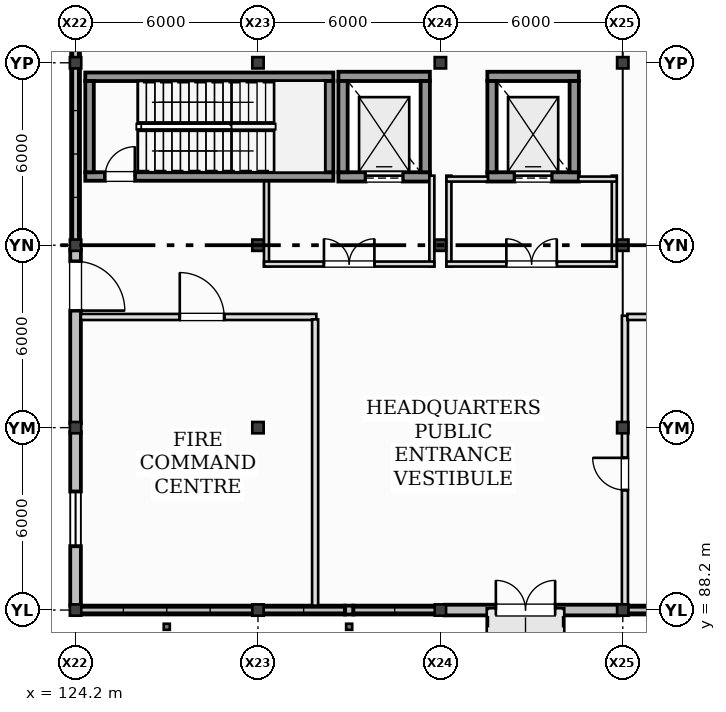
"""IFC4 building model, lengths in metres.
Left out: names, types, materials, properties, quantities, classifications, styles, units other than length and angle.
Written with IfcOpenShell. Run it as: python <this file> out.ifc"""

import sys

from ifc_helpers import new_model, si_unit, direction, frame, frame_2d, origin, origin_2d, place, context, subcontext, project, spatial, rectangle, hollow_rectangle, i_section, extrude, element, fill, save


model = new_model("IFC4")
c1 = context("Model", 3, precision=1e-05, world=origin(), true_north=direction((0.0, 1.0)))
c2 = subcontext(c1, "Body", "Model", "MODEL_VIEW")
j1 = project(units=[si_unit("LENGTHUNIT", "METRE"), si_unit("PLANEANGLEUNIT", "RADIAN")], contexts=[c1])
p1 = place(None, origin())
s1 = spatial("IfcSite", under=j1, at=p1, CompositionType="ELEMENT")
p2 = place(p1, origin())
s2 = spatial("IfcBuilding", under=s1, at=p2, CompositionType="ELEMENT")
p3 = place(p2, origin())
s3 = spatial("IfcBuildingStorey", under=s2, at=p3, CompositionType="ELEMENT", Elevation=0.0)
for number, where, z_axis, x_axis in (
    (1, (124.2, 88.2, 0.0), (0.0, 0.0, 1.0), (1.0, 0.0, 0.0)),
    (2, (124.2, 94.2, 0.0), (0.0, 0.0, 1.0), (1.0, 0.0, 0.0)),
    (3, (124.2, 100.2, 0.0), (0.0, 0.0, 1.0), (1.0, 0.0, 0.0)),
    (4, (124.2, 106.2, 0.0), (0.0, 0.0, 1.0), (1.0, 0.0, 0.0)),
    (5, (130.2, 88.2, 0.0), (0.0, 0.0, 1.0), (1.0, 0.0, 0.0)),
    (6, (130.2, 94.2, 0.0), (0.0, 0.0, 1.0), (1.0, 0.0, 0.0)),
    (7, (130.2, 100.2, 0.0), (0.0, 0.0, 1.0), (1.0, 0.0, 0.0)),
    (8, (130.2, 106.2, 0.0), (0.0, 0.0, 1.0), (1.0, 0.0, 0.0)),
    (9, (136.2, 88.2, 0.0), (0.0, 0.0, 1.0), (1.0, 0.0, 0.0)),
    (10, (136.2, 94.2, 0.0), (0.0, 0.0, 1.0), (1.0, 0.0, 0.0)),
    (11, (136.2, 100.2, 0.0), (0.0, 0.0, 1.0), (1.0, 0.0, 0.0)),
    (12, (136.2, 106.2, 0.0), (0.0, 0.0, 1.0), (1.0, 0.0, 0.0)),
    (13, (142.2, 88.2, 0.0), (0.0, 0.0, 1.0), (1.0, 0.0, 0.0)),
    (14, (142.2, 94.2, 0.0), (0.0, 0.0, 1.0), (1.0, 0.0, 0.0)),
    (15, (142.2, 100.2, 0.0), (0.0, 0.0, 1.0), (1.0, 0.0, 0.0)),
    (16, (142.2, 106.2, 0.0), (0.0, 0.0, 1.0), (1.0, 0.0, 0.0)),
):
    element("IfcColumn", number, at=place(p3, frame(where, z_axis=z_axis, x_axis=x_axis)), inside=s3, PredefinedType="COLUMN", context=c2, shape_type="SweptSolid", body=[
        extrude(i_section(OverallWidth=0.374, OverallDepth=0.372, WebThickness=0.016, FlangeThickness=0.026, at=origin_2d()), origin(), (0.0, 0.0, 1.0), 6.0),
    ])
for number, where, z_axis, x_axis in (
    (17, (127.2, 87.65, -0.35), (0.0, 0.0, 1.0), (1.0, 0.0, 0.0)),
    (18, (133.2, 87.65, -0.35), (0.0, 0.0, 1.0), (1.0, 0.0, 0.0)),
):
    element("IfcColumn", number, at=place(p3, frame(where, z_axis=z_axis, x_axis=x_axis)), inside=s3, PredefinedType="PILASTER", context=c2, shape_type="SweptSolid", body=[
        extrude(hollow_rectangle(XDim=0.2, YDim=0.2, WallThickness=0.01, at=origin_2d()), origin(), (0.0, 0.0, 1.0), 6.35),
    ])
p4 = place(p3, frame((124.345, 88.2, 0.0), z_axis=(0.0, 0.0, 1.0), x_axis=(1.0, 0.0, 0.0)))
e19 = element("IfcWall", 19, at=p4, inside=s3, PredefinedType="STANDARD", context=c2, shape_type="SweptSolid", body=[
    extrude(rectangle(XDim=5.71, YDim=0.29, at=frame_2d((2.855, 0.0))), origin(), (0.0, 0.0, 1.0), 0.68),
])
p5 = place(p3, frame((133.06, 88.2, 0.0), z_axis=(0.0, 0.0, 1.0), x_axis=(1.0, 0.0, 0.0)))
e20 = element("IfcWall", 20, at=p5, inside=s3, PredefinedType="STANDARD", context=c2, shape_type="SweptSolid", body=[
    extrude(rectangle(XDim=0.28, YDim=0.29, at=frame_2d((0.14, 0.0))), origin(), (0.0, 0.0, 1.0), 5.113),
])
p6 = place(p3, frame((130.345, 88.2, 0.0), z_axis=(0.0, 0.0, 1.0), x_axis=(1.0, 0.0, 0.0)))
e21 = element("IfcWall", 21, at=p6, inside=s3, PredefinedType="STANDARD", context=c2, shape_type="SweptSolid", body=[
    extrude(rectangle(XDim=2.715, YDim=0.29, at=frame_2d((1.357, 0.0))), origin(), (0.0, 0.0, 1.0), 0.8),
])
p7 = place(p3, frame((133.34, 88.2, 0.0), z_axis=(0.0, 0.0, 1.0), x_axis=(1.0, 0.0, 0.0)))
e22 = element("IfcWall", 22, at=p7, inside=s3, PredefinedType="STANDARD", context=c2, shape_type="SweptSolid", body=[
    extrude(rectangle(XDim=2.715, YDim=0.29, at=frame_2d((1.357, 0.0))), origin(), (0.0, 0.0, 1.0), 0.92),
])
p8 = place(p3, frame((136.345, 88.2, 0.0), z_axis=(0.0, 0.0, 1.0), x_axis=(1.0, 0.0, 0.0)))
e23 = element("IfcWall", 23, at=p8, inside=s3, PredefinedType="STANDARD", context=c2, shape_type="SweptSolid", body=[
    extrude(rectangle(XDim=5.71, YDim=0.35, at=frame_2d((2.855, 0.0))), origin(), (0.0, 0.0, 1.0), 5.113),
])
p9 = place(p8, frame((1.68, 0.0, 0.0)))
e24 = element("IfcOpeningElement", 24, at=p9, cuts=e23, PredefinedType="OPENING", context=c2, shape_type="SweptSolid", body=[
    extrude(rectangle(XDim=1.95, YDim=2.35, at=frame_2d((0.975, 1.175))), frame((0.0, 0.185, 0.0), z_axis=(0.0, -1.0, 0.0), x_axis=(1.0, 0.0, 0.0)), (0.0, 0.0, 1.0), 0.37),
])
p10 = place(p3, frame((142.345, 88.2, 0.0), z_axis=(0.0, 0.0, 1.0), x_axis=(1.0, 0.0, 0.0)))
e25 = element("IfcWall", 25, at=p10, inside=s3, PredefinedType="STANDARD", context=c2, shape_type="SweptSolid", body=[
    extrude(rectangle(XDim=2.715, YDim=0.29, at=frame_2d((1.357, 0.0))), origin(), (0.0, 0.0, 1.0), 0.32),
])
p11 = place(p3, frame((124.2, 94.055, 0.0), z_axis=(0.0, 0.0, 1.0), x_axis=(0.0, -1.0, 0.0)))
e26 = element("IfcWall", 26, at=p11, inside=s3, PredefinedType="STANDARD", context=c2, shape_type="SweptSolid", body=[
    extrude(rectangle(XDim=5.71, YDim=0.35, at=frame_2d((2.855, 0.0))), origin(), (0.0, 0.0, 1.0), 5.044),
])
p12 = place(p11, frame((1.955, 0.0, 1.0)))
e27 = element("IfcOpeningElement", 27, at=p12, cuts=e26, PredefinedType="OPENING", context=c2, shape_type="SweptSolid", body=[
    extrude(rectangle(XDim=1.8, YDim=1.36, at=frame_2d((0.9, 0.68))), frame((0.0, 0.185, 0.0), z_axis=(0.0, -1.0, 0.0), x_axis=(1.0, 0.0, 0.0)), (0.0, 0.0, 1.0), 0.37),
])
p13 = place(p3, frame((124.2, 100.055, 0.0), z_axis=(0.0, 0.0, 1.0), x_axis=(0.0, -1.0, 0.0)))
e28 = element("IfcWall", 28, at=p13, inside=s3, PredefinedType="STANDARD", context=c2, shape_type="SweptSolid", body=[
    extrude(rectangle(XDim=5.71, YDim=0.35, at=frame_2d((2.855, 0.0))), origin(), (0.0, 0.0, 1.0), 5.044),
])
p14 = place(p13, frame((0.386, 0.0, 0.0)))
e29 = element("IfcOpeningElement", 29, at=p14, cuts=e28, PredefinedType="OPENING", context=c2, shape_type="SweptSolid", body=[
    extrude(rectangle(XDim=1.62, YDim=2.2, at=frame_2d((0.81, 1.1))), frame((0.0, 0.185, 0.0), z_axis=(0.0, -1.0, 0.0), x_axis=(1.0, 0.0, 0.0)), (0.0, 0.0, 1.0), 0.37),
])
p15 = place(p3, frame((124.2, 106.055, 0.0), z_axis=(0.0, 0.0, 1.0), x_axis=(0.0, -1.0, 0.0)))
e30 = element("IfcWall", 30, at=p15, inside=s3, PredefinedType="STANDARD", context=c2, shape_type="SweptSolid", body=[
    extrude(rectangle(XDim=5.71, YDim=0.29, at=frame_2d((2.855, 0.0))), origin(), (0.0, 0.0, 1.0), 0.56),
])
p16 = place(p3, frame((124.2, 109.06, 0.0), z_axis=(0.0, 0.0, 1.0), x_axis=(0.0, -1.0, 0.0)))
e31 = element("IfcWall", 31, at=p16, inside=s3, PredefinedType="STANDARD", context=c2, shape_type="SweptSolid", body=[
    extrude(rectangle(XDim=2.715, YDim=0.29, at=frame_2d((1.357, 0.0))), origin(), (0.0, 0.0, 1.0), 0.8),
])
p17 = place(p3, frame((124.52, 102.46, 0.0), z_axis=(0.0, 0.0, 1.0), x_axis=(1.0, 0.0, 0.0)))
e32 = element("IfcWall", 32, at=p17, inside=s3, PredefinedType="SHEAR", context=c2, shape_type="SweptSolid", body=[
    extrude(rectangle(XDim=8.16, YDim=0.28, at=frame_2d((4.08, 0.0))), origin(), (0.0, 0.0, 1.0), 6.0),
])
p18 = place(p17, frame((0.65, 0.0, 0.0)))
e33 = element("IfcOpeningElement", 33, at=p18, cuts=e32, PredefinedType="OPENING", context=c2, shape_type="SweptSolid", body=[
    extrude(rectangle(XDim=0.98, YDim=2.15, at=frame_2d((0.49, 1.075))), frame((0.0, 0.15, 0.0), z_axis=(0.0, -1.0, 0.0), x_axis=(1.0, 0.0, 0.0)), (0.0, 0.0, 1.0), 0.3),
])
p19 = place(p3, frame((132.68, 105.74, 0.0), z_axis=(0.0, 0.0, 1.0), x_axis=(-1.0, 0.0, 0.0)))
e34 = element("IfcWall", 34, at=p19, inside=s3, PredefinedType="SHEAR", context=c2, shape_type="SweptSolid", body=[
    extrude(rectangle(XDim=8.16, YDim=0.28, at=frame_2d((4.08, 0.0))), origin(), (0.0, 0.0, 1.0), 6.0),
])
for number, where, z_axis, x_axis in (
    (35, (124.66, 105.6, 0.0), (0.0, 0.0, 1.0), (0.0, -1.0, 0.0)),
    (36, (132.54, 102.6, 0.0), (0.0, 0.0, 1.0), (0.0, 1.0, 0.0)),
):
    element("IfcWall", number, at=place(p3, frame(where, z_axis=z_axis, x_axis=x_axis)), inside=s3, PredefinedType="SHEAR", context=c2, shape_type="SweptSolid", body=[
        extrude(rectangle(XDim=3.0, YDim=0.28, at=frame_2d((1.5, 0.0))), origin(), (0.0, 0.0, 1.0), 6.0),
    ])
p20 = place(p3, frame((132.845, 102.448, 0.0), z_axis=(0.0, 0.0, 1.0), x_axis=(1.0, 0.0, 0.0)))
e37 = element("IfcWall", 37, at=p20, inside=s3, PredefinedType="SHEAR", context=c2, shape_type="SweptSolid", body=[
    extrude(rectangle(XDim=3.01, YDim=0.305, at=frame_2d((1.505, 0.0))), origin(), (0.0, 0.0, 1.0), 6.0),
])
p21 = place(p20, frame((0.895, 0.0, 0.0)))
e38 = element("IfcOpeningElement", 38, at=p21, cuts=e37, PredefinedType="OPENING", context=c2, shape_type="SweptSolid", body=[
    extrude(rectangle(XDim=1.22, YDim=2.22, at=frame_2d((0.61, 1.11))), frame((0.0, 0.162, 0.0), z_axis=(0.0, -1.0, 0.0), x_axis=(1.0, 0.0, 0.0)), (0.0, 0.0, 1.0), 0.325),
])
p22 = place(p3, frame((135.855, 105.752, 0.0), z_axis=(0.0, 0.0, 1.0), x_axis=(-1.0, 0.0, 0.0)))
e39 = element("IfcWall", 39, at=p22, inside=s3, PredefinedType="SHEAR", context=c2, shape_type="SweptSolid", body=[
    extrude(rectangle(XDim=3.01, YDim=0.305, at=frame_2d((1.505, 0.0))), origin(), (0.0, 0.0, 1.0), 6.0),
])
for number, where, z_axis, x_axis in (
    (40, (132.998, 105.6, 0.0), (0.0, 0.0, 1.0), (0.0, -1.0, 0.0)),
    (41, (135.702, 102.6, 0.0), (0.0, 0.0, 1.0), (0.0, 1.0, 0.0)),
):
    element("IfcWall", number, at=place(p3, frame(where, z_axis=z_axis, x_axis=x_axis)), inside=s3, PredefinedType="SHEAR", context=c2, shape_type="SweptSolid", body=[
        extrude(rectangle(XDim=3.0, YDim=0.305, at=frame_2d((1.5, 0.0))), origin(), (0.0, 0.0, 1.0), 6.0),
    ])
for number, where, z_axis, x_axis in (
    (42, (130.48, 99.5, 0.0), (0.0, 0.0, 1.0), (0.0, 1.0, 0.0)),
    (43, (135.92, 102.488, 0.0), (0.0, 0.0, 1.0), (0.0, -1.0, 0.0)),
):
    element("IfcWall", number, at=place(p3, frame(where, z_axis=z_axis, x_axis=x_axis)), inside=s3, PredefinedType="PARTITIONING", context=c2, shape_type="SweptSolid", body=[
        extrude(rectangle(XDim=2.988, YDim=0.165, at=frame_2d((1.494, 0.0))), origin(), (0.0, 0.0, 1.0), 5.044),
    ])
p23 = place(p3, frame((130.4, 99.58, 0.0), z_axis=(0.0, 0.0, 1.0), x_axis=(1.0, 0.0, 0.0)))
e44 = element("IfcWall", 44, at=p23, inside=s3, PredefinedType="PARTITIONING", context=c2, shape_type="SweptSolid", body=[
    extrude(rectangle(XDim=5.6, YDim=0.165, at=frame_2d((2.8, 0.0))), origin(), (0.0, 0.0, 1.0), 5.68),
])
p24 = place(p23, frame((1.97, 0.0, 0.0)))
e45 = element("IfcOpeningElement", 45, at=p24, cuts=e44, PredefinedType="OPENING", context=c2, shape_type="SweptSolid", body=[
    extrude(rectangle(XDim=1.66, YDim=2.2, at=frame_2d((0.83, 1.1))), frame((0.0, 0.093, 0.0), z_axis=(0.0, -1.0, 0.0), x_axis=(1.0, 0.0, 0.0)), (0.0, 0.0, 1.0), 0.185),
])
p25 = place(p3, frame((137.745, 102.448, 0.0), z_axis=(0.0, 0.0, 1.0), x_axis=(1.0, 0.0, 0.0)))
e46 = element("IfcWall", 46, at=p25, inside=s3, PredefinedType="SHEAR", context=c2, shape_type="SweptSolid", body=[
    extrude(rectangle(XDim=3.01, YDim=0.305, at=frame_2d((1.505, 0.0))), origin(), (0.0, 0.0, 1.0), 6.0),
])
p26 = place(p25, frame((0.895, 0.0, 0.0)))
e47 = element("IfcOpeningElement", 47, at=p26, cuts=e46, PredefinedType="OPENING", context=c2, shape_type="SweptSolid", body=[
    extrude(rectangle(XDim=1.22, YDim=2.22, at=frame_2d((0.61, 1.11))), frame((0.0, 0.162, 0.0), z_axis=(0.0, -1.0, 0.0), x_axis=(1.0, 0.0, 0.0)), (0.0, 0.0, 1.0), 0.325),
])
p27 = place(p3, frame((140.755, 105.752, 0.0), z_axis=(0.0, 0.0, 1.0), x_axis=(-1.0, 0.0, 0.0)))
e48 = element("IfcWall", 48, at=p27, inside=s3, PredefinedType="SHEAR", context=c2, shape_type="SweptSolid", body=[
    extrude(rectangle(XDim=3.01, YDim=0.305, at=frame_2d((1.505, 0.0))), origin(), (0.0, 0.0, 1.0), 6.0),
])
for number, where, z_axis, x_axis in (
    (49, (137.897, 105.6, 0.0), (0.0, 0.0, 1.0), (0.0, -1.0, 0.0)),
    (50, (140.603, 102.6, 0.0), (0.0, 0.0, 1.0), (0.0, 1.0, 0.0)),
):
    element("IfcWall", number, at=place(p3, frame(where, z_axis=z_axis, x_axis=x_axis)), inside=s3, PredefinedType="SHEAR", context=c2, shape_type="SweptSolid", body=[
        extrude(rectangle(XDim=3.0, YDim=0.305, at=frame_2d((1.5, 0.0))), origin(), (0.0, 0.0, 1.0), 6.0),
    ])
for number, where, z_axis, x_axis in (
    (51, (136.48, 99.5, 0.0), (0.0, 0.0, 1.0), (0.0, 1.0, 0.0)),
    (52, (141.92, 102.488, 0.0), (0.0, 0.0, 1.0), (0.0, -1.0, 0.0)),
):
    element("IfcWall", number, at=place(p3, frame(where, z_axis=z_axis, x_axis=x_axis)), inside=s3, PredefinedType="PARTITIONING", context=c2, shape_type="SweptSolid", body=[
        extrude(rectangle(XDim=2.988, YDim=0.165, at=frame_2d((1.494, 0.0))), origin(), (0.0, 0.0, 1.0), 5.044),
    ])
p28 = place(p3, frame((136.4, 102.375, 0.0), z_axis=(0.0, 0.0, 1.0), x_axis=(1.0, 0.0, 0.0)))
e53 = element("IfcWall", 53, at=p28, inside=s3, PredefinedType="PARTITIONING", context=c2, shape_type="SweptSolid", body=[
    extrude(rectangle(XDim=1.365, YDim=0.165, at=frame_2d((0.683, 0.0))), origin(), (0.0, 0.0, 1.0), 5.68),
])
p29 = place(p3, frame((140.735, 102.375, 0.0), z_axis=(0.0, 0.0, 1.0), x_axis=(1.0, 0.0, 0.0)))
e54 = element("IfcWall", 54, at=p29, inside=s3, PredefinedType="PARTITIONING", context=c2, shape_type="SweptSolid", body=[
    extrude(rectangle(XDim=1.265, YDim=0.165, at=frame_2d((0.632, 0.0))), origin(), (0.0, 0.0, 1.0), 5.68),
])
p30 = place(p3, frame((136.4, 99.58, 0.0), z_axis=(0.0, 0.0, 1.0), x_axis=(1.0, 0.0, 0.0)))
e55 = element("IfcWall", 55, at=p30, inside=s3, PredefinedType="PARTITIONING", context=c2, shape_type="SweptSolid", body=[
    extrude(rectangle(XDim=5.6, YDim=0.165, at=frame_2d((2.8, 0.0))), origin(), (0.0, 0.0, 1.0), 5.68),
])
p31 = place(p30, frame((1.97, 0.0, 0.0)))
e56 = element("IfcOpeningElement", 56, at=p31, cuts=e55, PredefinedType="OPENING", context=c2, shape_type="SweptSolid", body=[
    extrude(rectangle(XDim=1.66, YDim=2.2, at=frame_2d((0.83, 1.1))), frame((0.0, 0.093, 0.0), z_axis=(0.0, -1.0, 0.0), x_axis=(1.0, 0.0, 0.0)), (0.0, 0.0, 1.0), 0.185),
])
p32 = place(p3, frame((124.375, 97.84, 0.0), z_axis=(0.0, 0.0, 1.0), x_axis=(1.0, 0.0, 0.0)))
e57 = element("IfcWall", 57, at=p32, inside=s3, PredefinedType="PARTITIONING", context=c2, shape_type="SweptSolid", body=[
    extrude(rectangle(XDim=7.745, YDim=0.2, at=frame_2d((3.873, 0.0))), origin(), (0.0, 0.0, 1.0), 5.68),
])
p33 = place(p32, frame((3.253, 0.0, 0.0)))
e58 = element("IfcOpeningElement", 58, at=p33, cuts=e57, PredefinedType="OPENING", context=c2, shape_type="SweptSolid", body=[
    extrude(rectangle(XDim=1.46, YDim=2.3, at=frame_2d((0.73, 1.15))), frame((0.0, 0.11, 0.0), z_axis=(0.0, -1.0, 0.0), x_axis=(1.0, 0.0, 0.0)), (0.0, 0.0, 1.0), 0.22),
])
p34 = place(p3, frame((132.08, 97.76, 0.0), z_axis=(0.0, 0.0, 1.0), x_axis=(0.0, -1.0, 0.0)))
e59 = element("IfcWall", 59, at=p34, inside=s3, PredefinedType="PARTITIONING", context=c2, shape_type="SweptSolid", body=[
    extrude(rectangle(XDim=9.415, YDim=0.2, at=frame_2d((4.708, 0.0))), origin(), (0.0, 0.0, 1.0), 5.249),
])
p35 = place(p3, frame((142.27, 88.375, 0.0), z_axis=(0.0, 0.0, 1.0), x_axis=(0.0, 1.0, 0.0)))
e60 = element("IfcWall", 60, at=p35, inside=s3, PredefinedType="PARTITIONING", context=c2, shape_type="SweptSolid", body=[
    extrude(rectangle(XDim=9.505, YDim=0.2, at=frame_2d((4.752, 0.0))), origin(), (0.0, 0.0, 1.0), 5.044),
])
p36 = place(p35, frame((3.771, 0.0, 0.0)))
e61 = element("IfcOpeningElement", 61, at=p36, cuts=e60, PredefinedType="OPENING", context=c2, shape_type="SweptSolid", body=[
    extrude(rectangle(XDim=1.06, YDim=2.25, at=frame_2d((0.53, 1.125))), frame((0.0, 0.11, 0.0), z_axis=(0.0, -1.0, 0.0), x_axis=(1.0, 0.0, 0.0)), (0.0, 0.0, 1.0), 0.22),
])
p37 = place(p3, frame((142.35, 97.84, 0.0), z_axis=(0.0, 0.0, 1.0), x_axis=(1.0, 0.0, 0.0)))
e62 = element("IfcWall", 62, at=p37, inside=s3, PredefinedType="PARTITIONING", context=c2, shape_type="SweptSolid", body=[
    extrude(rectangle(XDim=11.77, YDim=0.2, at=frame_2d((5.885, 0.0))), origin(), (0.0, 0.0, 1.0), 5.68),
])
p38 = place(p9, frame((1.95, 0.0, 0.0), z_axis=(0.0, 0.0, 1.0), x_axis=(-1.0, 0.0, 0.0)))
e63 = element("IfcDoor", 63, at=p38, inside=s3, OperationType="DOUBLE_DOOR_SINGLE_SWING", PredefinedType="DOOR", context=c2, shape_type="SweptSolid", body=[
    extrude(rectangle(XDim=1.95, YDim=2.35, at=frame_2d((0.975, 1.175))), frame((0.0, 0.025, 0.0), z_axis=(0.0, -1.0, 0.0), x_axis=(1.0, 0.0, 0.0)), (0.0, 0.0, 1.0), 0.05),
])
fill(e24, e63)
p39 = place(p12, origin())
e64 = element("IfcWindow", 64, at=p39, inside=s3, PartitioningType="SINGLE_PANEL", PredefinedType="WINDOW", context=c2, shape_type="SweptSolid", body=[
    extrude(rectangle(XDim=1.8, YDim=1.36, at=frame_2d((0.9, 0.68))), frame((0.0, 0.03, 0.0), z_axis=(0.0, -1.0, 0.0), x_axis=(1.0, 0.0, 0.0)), (0.0, 0.0, 1.0), 0.06),
])
fill(e27, e64)
p40 = place(p14, frame((1.62, 0.0, 0.0), z_axis=(0.0, 0.0, 1.0), x_axis=(-1.0, 0.0, 0.0)))
e65 = element("IfcDoor", 65, at=p40, inside=s3, OperationType="SINGLE_SWING_RIGHT", PredefinedType="DOOR", context=c2, shape_type="SweptSolid", body=[
    extrude(rectangle(XDim=1.62, YDim=2.2, at=frame_2d((0.81, 1.1))), frame((0.0, 0.025, 0.0), z_axis=(0.0, -1.0, 0.0), x_axis=(1.0, 0.0, 0.0)), (0.0, 0.0, 1.0), 0.05),
])
fill(e29, e65)
p41 = place(p18, origin())
e66 = element("IfcDoor", 66, at=p41, inside=s3, OperationType="SINGLE_SWING_RIGHT", PredefinedType="DOOR", context=c2, shape_type="SweptSolid", body=[
    extrude(rectangle(XDim=0.98, YDim=2.15, at=frame_2d((0.49, 1.075))), frame((0.0, 0.025, 0.0), z_axis=(0.0, -1.0, 0.0), x_axis=(1.0, 0.0, 0.0)), (0.0, 0.0, 1.0), 0.05),
])
fill(e33, e66)
p42 = place(p21, origin())
e67 = element("IfcDoor", 67, at=p42, inside=s3, OperationType="SLIDING_TO_LEFT", PredefinedType="DOOR", context=c2, shape_type="SweptSolid", body=[
    extrude(rectangle(XDim=1.22, YDim=2.22, at=frame_2d((0.61, 1.11))), frame((0.0, 0.025, 0.0), z_axis=(0.0, -1.0, 0.0), x_axis=(1.0, 0.0, 0.0)), (0.0, 0.0, 1.0), 0.05),
])
fill(e38, e67)
p43 = place(p24, frame((1.66, 0.0, 0.0), z_axis=(0.0, 0.0, 1.0), x_axis=(-1.0, 0.0, 0.0)))
e68 = element("IfcDoor", 68, at=p43, inside=s3, OperationType="DOUBLE_DOOR_SINGLE_SWING", PredefinedType="DOOR", context=c2, shape_type="SweptSolid", body=[
    extrude(rectangle(XDim=1.66, YDim=2.2, at=frame_2d((0.83, 1.1))), frame((0.0, 0.025, 0.0), z_axis=(0.0, -1.0, 0.0), x_axis=(1.0, 0.0, 0.0)), (0.0, 0.0, 1.0), 0.05),
])
fill(e45, e68)
p44 = place(p26, origin())
e69 = element("IfcDoor", 69, at=p44, inside=s3, OperationType="SLIDING_TO_LEFT", PredefinedType="DOOR", context=c2, shape_type="SweptSolid", body=[
    extrude(rectangle(XDim=1.22, YDim=2.22, at=frame_2d((0.61, 1.11))), frame((0.0, 0.025, 0.0), z_axis=(0.0, -1.0, 0.0), x_axis=(1.0, 0.0, 0.0)), (0.0, 0.0, 1.0), 0.05),
])
fill(e47, e69)
p45 = place(p31, frame((1.66, 0.0, 0.0), z_axis=(0.0, 0.0, 1.0), x_axis=(-1.0, 0.0, 0.0)))
e70 = element("IfcDoor", 70, at=p45, inside=s3, OperationType="DOUBLE_DOOR_SINGLE_SWING", PredefinedType="DOOR", context=c2, shape_type="SweptSolid", body=[
    extrude(rectangle(XDim=1.66, YDim=2.2, at=frame_2d((0.83, 1.1))), frame((0.0, 0.025, 0.0), z_axis=(0.0, -1.0, 0.0), x_axis=(1.0, 0.0, 0.0)), (0.0, 0.0, 1.0), 0.05),
])
fill(e56, e70)
p46 = place(p33, frame((1.46, 0.0, 0.0), z_axis=(0.0, 0.0, 1.0), x_axis=(-1.0, 0.0, 0.0)))
e71 = element("IfcDoor", 71, at=p46, inside=s3, OperationType="SINGLE_SWING_LEFT", PredefinedType="DOOR", context=c2, shape_type="SweptSolid", body=[
    extrude(rectangle(XDim=1.46, YDim=2.3, at=frame_2d((0.73, 1.15))), frame((0.0, 0.025, 0.0), z_axis=(0.0, -1.0, 0.0), x_axis=(1.0, 0.0, 0.0)), (0.0, 0.0, 1.0), 0.05),
])
fill(e58, e71)
p47 = place(p36, frame((1.06, 0.0, 0.0), z_axis=(0.0, 0.0, 1.0), x_axis=(-1.0, 0.0, 0.0)))
e72 = element("IfcDoor", 72, at=p47, inside=s3, OperationType="SINGLE_SWING_RIGHT", PredefinedType="DOOR", context=c2, shape_type="SweptSolid", body=[
    extrude(rectangle(XDim=1.06, YDim=2.25, at=frame_2d((0.53, 1.125))), frame((0.0, 0.025, 0.0), z_axis=(0.0, -1.0, 0.0), x_axis=(1.0, 0.0, 0.0)), (0.0, 0.0, 1.0), 0.05),
])
fill(e61, e72)
save(model, sys.argv[1])
